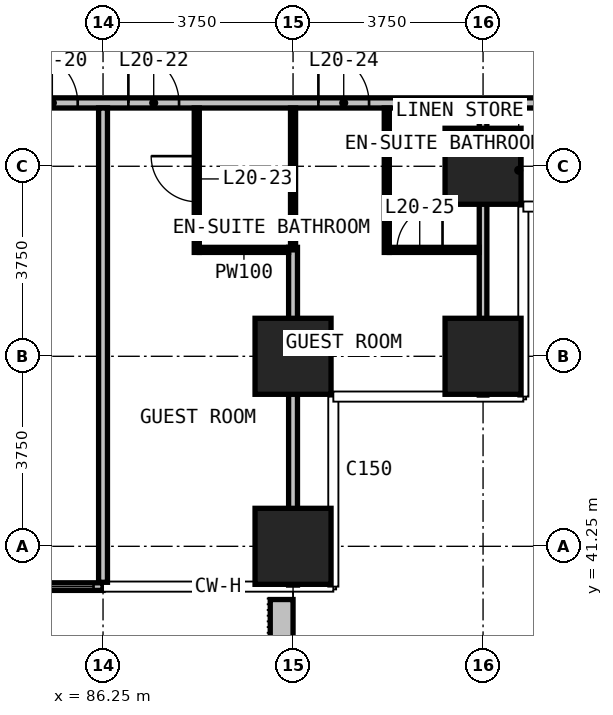
"""IFC4 building model, lengths in metres.
Left out: names, types, materials, properties, quantities, classifications, styles, units other than length and angle.
Written with IfcOpenShell. Run it as: python <this file> out.ifc"""

import sys

from ifc_helpers import new_model, si_unit, direction, frame, frame_2d, origin, origin_2d, place, context, subcontext, project, spatial, rectangle, extrude, element, fill, save


model = new_model("IFC4")
c1 = context("Model", 3, precision=1e-05, world=origin(), true_north=direction((0.0, 1.0)))
c2 = subcontext(c1, "Body", "Model", "MODEL_VIEW")
j1 = project(units=[si_unit("LENGTHUNIT", "METRE"), si_unit("PLANEANGLEUNIT", "RADIAN")], contexts=[c1])
p1 = place(None, origin())
s1 = spatial("IfcSite", under=j1, at=p1, CompositionType="ELEMENT")
p2 = place(p1, origin())
s2 = spatial("IfcBuilding", under=s1, at=p2, CompositionType="ELEMENT")
p3 = place(p2, frame((0.0, 0.0, 85.7)))
s3 = spatial("IfcBuildingStorey", under=s2, at=p3, CompositionType="ELEMENT", Elevation=85.7)
for number, where, z_axis, x_axis in (
    (1, (90.0, 41.25, 0.0), (0.0, 0.0, 1.0), (1.0, 0.0, 0.0)),
    (2, (90.0, 45.0, 0.0), (0.0, 0.0, 1.0), (1.0, 0.0, 0.0)),
    (3, (93.75, 45.0, 0.0), (0.0, 0.0, 1.0), (1.0, 0.0, 0.0)),
    (4, (93.75, 48.75, 0.0), (0.0, 0.0, 1.0), (1.0, 0.0, 0.0)),
):
    element("IfcColumn", number, at=place(p3, frame(where, z_axis=z_axis, x_axis=x_axis)), inside=s3, PredefinedType="COLUMN", context=c2, shape_type="SweptSolid", body=[
        extrude(rectangle(XDim=1.5, YDim=1.5, at=origin_2d()), origin(), (0.0, 0.0, 1.0), 3.3),
    ])
p4 = place(p3, frame((82.5, 40.455, 0.0), z_axis=(0.0, 0.0, 1.0), x_axis=(1.0, 0.0, 0.0)))
e5 = element("IfcWall", 5, at=p4, inside=s3, PredefinedType="SOLIDWALL", context=c2, shape_type="SweptSolid", body=[
    extrude(rectangle(XDim=3.75, YDim=0.15, at=frame_2d((1.875, 0.0))), origin(), (0.0, 0.0, 1.0), 3.0),
])
p5 = place(p4, frame((1.275, 0.0, 0.0)))
e6 = element("IfcOpeningElement", 6, at=p5, cuts=e5, PredefinedType="OPENING", context=c2, shape_type="SweptSolid", body=[
    extrude(rectangle(XDim=1.2, YDim=2.4, at=frame_2d((0.6, 1.2))), frame((0.0, 0.085, 0.0), z_axis=(0.0, -1.0, 0.0), x_axis=(1.0, 0.0, 0.0)), (0.0, 0.0, 1.0), 0.17),
])
p6 = place(p4, frame((2.663, 0.0, 0.1)))
e7 = element("IfcOpeningElement", 7, at=p6, cuts=e5, PredefinedType="OPENING", context=c2, shape_type="SweptSolid", body=[
    extrude(rectangle(XDim=0.9, YDim=2.4, at=frame_2d((0.45, 1.2))), frame((0.0, 0.085, 0.0), z_axis=(0.0, -1.0, 0.0), x_axis=(1.0, 0.0, 0.0)), (0.0, 0.0, 1.0), 0.17),
])
p7 = place(p3, frame((89.775, 40.2, 0.0), z_axis=(0.0, 0.0, 1.0), x_axis=(0.0, -1.0, 0.0)))
e8 = element("IfcWall", 8, at=p7, inside=s3, PredefinedType="USERDEFINED", context=c2, shape_type="SweptSolid", body=[
    extrude(rectangle(XDim=2.35, YDim=0.45, at=frame_2d((1.175, 0.0))), origin(), (0.0, 0.0, 1.0), 1.1),
])
p8 = place(p3, frame((51.735, 50.0, 0.0), z_axis=(0.0, 0.0, 1.0), x_axis=(1.0, 0.0, 0.0)))
e9 = element("IfcWall", 9, at=p8, inside=s3, PredefinedType="PARTITIONING", context=c2, shape_type="SweptSolid", body=[
    extrude(rectangle(XDim=46.53, YDim=0.2, at=frame_2d((23.265, 0.0))), origin(), (0.0, 0.0, 1.0), 3.0),
])
p9 = place(p8, frame((6.765, 0.0, 0.0)))
e10 = element("IfcOpeningElement", 10, at=p9, cuts=e9, PredefinedType="OPENING", context=c2, shape_type="SweptSolid", body=[
    extrude(rectangle(XDim=1.0, YDim=2.2, at=frame_2d((0.5, 1.1))), frame((0.0, 0.11, 0.0), z_axis=(0.0, -1.0, 0.0), x_axis=(1.0, 0.0, 0.0)), (0.0, 0.0, 1.0), 0.22),
])
p10 = place(p8, frame((10.515, 0.0, 0.0)))
e11 = element("IfcOpeningElement", 11, at=p10, cuts=e9, PredefinedType="OPENING", context=c2, shape_type="SweptSolid", body=[
    extrude(rectangle(XDim=1.0, YDim=2.2, at=frame_2d((0.5, 1.1))), frame((0.0, 0.11, 0.0), z_axis=(0.0, -1.0, 0.0), x_axis=(1.0, 0.0, 0.0)), (0.0, 0.0, 1.0), 0.22),
])
p11 = place(p8, frame((12.515, 0.0, 0.0)))
e12 = element("IfcOpeningElement", 12, at=p11, cuts=e9, PredefinedType="OPENING", context=c2, shape_type="SweptSolid", body=[
    extrude(rectangle(XDim=1.0, YDim=2.2, at=frame_2d((0.5, 1.1))), frame((0.0, 0.11, 0.0), z_axis=(0.0, -1.0, 0.0), x_axis=(1.0, 0.0, 0.0)), (0.0, 0.0, 1.0), 0.22),
])
p12 = place(p8, frame((18.015, 0.0, 0.0)))
e13 = element("IfcOpeningElement", 13, at=p12, cuts=e9, PredefinedType="OPENING", context=c2, shape_type="SweptSolid", body=[
    extrude(rectangle(XDim=1.0, YDim=2.2, at=frame_2d((0.5, 1.1))), frame((0.0, 0.11, 0.0), z_axis=(0.0, -1.0, 0.0), x_axis=(1.0, 0.0, 0.0)), (0.0, 0.0, 1.0), 0.22),
])
p13 = place(p8, frame((20.015, 0.0, 0.0)))
e14 = element("IfcOpeningElement", 14, at=p13, cuts=e9, PredefinedType="OPENING", context=c2, shape_type="SweptSolid", body=[
    extrude(rectangle(XDim=1.0, YDim=2.2, at=frame_2d((0.5, 1.1))), frame((0.0, 0.11, 0.0), z_axis=(0.0, -1.0, 0.0), x_axis=(1.0, 0.0, 0.0)), (0.0, 0.0, 1.0), 0.22),
])
p14 = place(p8, frame((25.515, 0.0, 0.0)))
e15 = element("IfcOpeningElement", 15, at=p14, cuts=e9, PredefinedType="OPENING", context=c2, shape_type="SweptSolid", body=[
    extrude(rectangle(XDim=1.0, YDim=2.2, at=frame_2d((0.5, 1.1))), frame((0.0, 0.11, 0.0), z_axis=(0.0, -1.0, 0.0), x_axis=(1.0, 0.0, 0.0)), (0.0, 0.0, 1.0), 0.22),
])
p15 = place(p8, frame((27.515, 0.0, 0.0)))
e16 = element("IfcOpeningElement", 16, at=p15, cuts=e9, PredefinedType="OPENING", context=c2, shape_type="SweptSolid", body=[
    extrude(rectangle(XDim=1.0, YDim=2.2, at=frame_2d((0.5, 1.1))), frame((0.0, 0.11, 0.0), z_axis=(0.0, -1.0, 0.0), x_axis=(1.0, 0.0, 0.0)), (0.0, 0.0, 1.0), 0.22),
])
p16 = place(p8, frame((33.015, 0.0, 0.0)))
e17 = element("IfcOpeningElement", 17, at=p16, cuts=e9, PredefinedType="OPENING", context=c2, shape_type="SweptSolid", body=[
    extrude(rectangle(XDim=1.0, YDim=2.2, at=frame_2d((0.5, 1.1))), frame((0.0, 0.11, 0.0), z_axis=(0.0, -1.0, 0.0), x_axis=(1.0, 0.0, 0.0)), (0.0, 0.0, 1.0), 0.22),
])
p17 = place(p8, frame((35.015, 0.0, 0.0)))
e18 = element("IfcOpeningElement", 18, at=p17, cuts=e9, PredefinedType="OPENING", context=c2, shape_type="SweptSolid", body=[
    extrude(rectangle(XDim=1.0, YDim=2.2, at=frame_2d((0.5, 1.1))), frame((0.0, 0.11, 0.0), z_axis=(0.0, -1.0, 0.0), x_axis=(1.0, 0.0, 0.0)), (0.0, 0.0, 1.0), 0.22),
])
p18 = place(p8, frame((38.765, 0.0, 0.0)))
e19 = element("IfcOpeningElement", 19, at=p18, cuts=e9, PredefinedType="OPENING", context=c2, shape_type="SweptSolid", body=[
    extrude(rectangle(XDim=1.0, YDim=2.2, at=frame_2d((0.5, 1.1))), frame((0.0, 0.11, 0.0), z_axis=(0.0, -1.0, 0.0), x_axis=(1.0, 0.0, 0.0)), (0.0, 0.0, 1.0), 0.22),
])
p19 = place(p8, frame((1.8, 0.0, 0.0)))
e20 = element("IfcOpeningElement", 20, at=p19, cuts=e9, PredefinedType="OPENING", context=c2, shape_type="SweptSolid", body=[
    extrude(rectangle(XDim=0.9, YDim=2.2, at=frame_2d((0.45, 1.1))), frame((0.0, 0.11, 0.0), z_axis=(0.0, -1.0, 0.0), x_axis=(1.0, 0.0, 0.0)), (0.0, 0.0, 1.0), 0.22),
])
p20 = place(p8, frame((43.815, 0.0, 0.0)))
e21 = element("IfcOpeningElement", 21, at=p20, cuts=e9, PredefinedType="OPENING", context=c2, shape_type="SweptSolid", body=[
    extrude(rectangle(XDim=0.9, YDim=2.2, at=frame_2d((0.45, 1.1))), frame((0.0, 0.11, 0.0), z_axis=(0.0, -1.0, 0.0), x_axis=(1.0, 0.0, 0.0)), (0.0, 0.0, 1.0), 0.22),
])
p21 = place(p3, frame((86.25, 40.54, 0.0), z_axis=(0.0, 0.0, 1.0), x_axis=(0.0, 1.0, 0.0)))
e22 = element("IfcWall", 22, at=p21, inside=s3, PredefinedType="PARTITIONING", context=c2, shape_type="SweptSolid", body=[
    extrude(rectangle(XDim=9.36, YDim=0.175, at=frame_2d((4.68, 0.0))), origin(), (0.0, 0.0, 1.0), 3.0),
])
p22 = place(p3, frame((90.0, 40.485, 0.0), z_axis=(0.0, 0.0, 1.0), x_axis=(0.0, 1.0, 0.0)))
e23 = element("IfcWall", 23, at=p22, inside=s3, PredefinedType="PARTITIONING", context=c2, shape_type="SweptSolid", body=[
    extrude(rectangle(XDim=6.665, YDim=0.175, at=frame_2d((3.333, 0.0))), origin(), (0.0, 0.0, 1.0), 3.0),
])
p23 = place(p3, frame((93.75, 44.235, 0.0), z_axis=(0.0, 0.0, 1.0), x_axis=(0.0, 1.0, 0.0)))
e24 = element("IfcWall", 24, at=p23, inside=s3, PredefinedType="PARTITIONING", context=c2, shape_type="SweptSolid", body=[
    extrude(rectangle(XDim=5.665, YDim=0.15, at=frame_2d((2.833, 0.0))), origin(), (0.0, 0.0, 1.0), 3.0),
])
p24 = place(p3, frame((88.15, 47.1, 0.0), z_axis=(0.0, 0.0, 1.0), x_axis=(1.0, 0.0, 0.0)))
e25 = element("IfcWall", 25, at=p24, inside=s3, PredefinedType="PARTITIONING", context=c2, shape_type="SweptSolid", body=[
    extrude(rectangle(XDim=1.762, YDim=0.1, at=frame_2d((0.881, 0.0))), origin(), (0.0, 0.0, 1.0), 3.0),
])
p25 = place(p3, frame((91.9, 47.1, 0.0), z_axis=(0.0, 0.0, 1.0), x_axis=(1.0, 0.0, 0.0)))
e26 = element("IfcWall", 26, at=p25, inside=s3, PredefinedType="PARTITIONING", context=c2, shape_type="SweptSolid", body=[
    extrude(rectangle(XDim=1.775, YDim=0.1, at=frame_2d((0.888, 0.0))), origin(), (0.0, 0.0, 1.0), 3.0),
])
p26 = place(p25, frame((0.15, 0.0, 0.0)))
e27 = element("IfcOpeningElement", 27, at=p26, cuts=e26, PredefinedType="OPENING", context=c2, shape_type="SweptSolid", body=[
    extrude(rectangle(XDim=0.9, YDim=2.2, at=frame_2d((0.45, 1.1))), frame((0.0, 0.06, 0.0), z_axis=(0.0, -1.0, 0.0), x_axis=(1.0, 0.0, 0.0)), (0.0, 0.0, 1.0), 0.12),
])
p27 = place(p3, frame((88.1, 47.05, 0.0), z_axis=(0.0, 0.0, 1.0), x_axis=(0.0, 1.0, 0.0)))
e28 = element("IfcWall", 28, at=p27, inside=s3, PredefinedType="PARTITIONING", context=c2, shape_type="SweptSolid", body=[
    extrude(rectangle(XDim=2.85, YDim=0.1, at=frame_2d((1.425, 0.0))), origin(), (0.0, 0.0, 1.0), 3.0),
])
p28 = place(p27, frame((1.0, 0.0, 0.0)))
e29 = element("IfcOpeningElement", 29, at=p28, cuts=e28, PredefinedType="OPENING", context=c2, shape_type="SweptSolid", body=[
    extrude(rectangle(XDim=0.9, YDim=2.2, at=frame_2d((0.45, 1.1))), frame((0.0, 0.06, 0.0), z_axis=(0.0, -1.0, 0.0), x_axis=(1.0, 0.0, 0.0)), (0.0, 0.0, 1.0), 0.12),
])
p29 = place(p3, frame((90.0, 47.1, 0.0), z_axis=(0.0, 0.0, 1.0), x_axis=(0.0, 1.0, 0.0)))
e30 = element("IfcWall", 30, at=p29, inside=s3, PredefinedType="PARTITIONING", context=c2, shape_type="SweptSolid", body=[
    extrude(rectangle(XDim=2.8, YDim=0.1, at=frame_2d((1.4, 0.0))), origin(), (0.0, 0.0, 1.0), 3.0),
])
p30 = place(p3, frame((91.85, 47.05, 0.0), z_axis=(0.0, 0.0, 1.0), x_axis=(0.0, 1.0, 0.0)))
e31 = element("IfcWall", 31, at=p30, inside=s3, PredefinedType="PARTITIONING", context=c2, shape_type="SweptSolid", body=[
    extrude(rectangle(XDim=2.85, YDim=0.1, at=frame_2d((1.425, 0.0))), origin(), (0.0, 0.0, 1.0), 3.0),
])
p31 = place(p6, origin())
e32 = element("IfcWindow", 32, at=p31, inside=s3, PartitioningType="SINGLE_PANEL", PredefinedType="WINDOW", context=c2, shape_type="SweptSolid", body=[
    extrude(rectangle(XDim=0.9, YDim=2.4, at=frame_2d((0.45, 1.2))), frame((0.0, 0.03, 0.0), z_axis=(0.0, -1.0, 0.0), x_axis=(1.0, 0.0, 0.0)), (0.0, 0.0, 1.0), 0.06),
])
fill(e7, e32)
p32 = place(p16, origin())
e33 = element("IfcDoor", 33, at=p32, inside=s3, OperationType="SINGLE_SWING_RIGHT", PredefinedType="DOOR", context=c2, shape_type="SweptSolid", body=[
    extrude(rectangle(XDim=1.0, YDim=2.2, at=frame_2d((0.5, 1.1))), frame((0.0, 0.025, 0.0), z_axis=(0.0, -1.0, 0.0), x_axis=(1.0, 0.0, 0.0)), (0.0, 0.0, 1.0), 0.05),
])
fill(e17, e33)
p33 = place(p17, origin())
e34 = element("IfcDoor", 34, at=p33, inside=s3, OperationType="SINGLE_SWING_LEFT", PredefinedType="DOOR", context=c2, shape_type="SweptSolid", body=[
    extrude(rectangle(XDim=1.0, YDim=2.2, at=frame_2d((0.5, 1.1))), frame((0.0, 0.025, 0.0), z_axis=(0.0, -1.0, 0.0), x_axis=(1.0, 0.0, 0.0)), (0.0, 0.0, 1.0), 0.05),
])
fill(e18, e34)
p34 = place(p28, origin())
e35 = element("IfcDoor", 35, at=p34, inside=s3, OperationType="SINGLE_SWING_RIGHT", PredefinedType="DOOR", context=c2, shape_type="SweptSolid", body=[
    extrude(rectangle(XDim=0.9, YDim=2.2, at=frame_2d((0.45, 1.1))), frame((0.0, 0.025, 0.0), z_axis=(0.0, -1.0, 0.0), x_axis=(1.0, 0.0, 0.0)), (0.0, 0.0, 1.0), 0.05),
])
fill(e29, e35)
p35 = place(p18, origin())
e36 = element("IfcDoor", 36, at=p35, inside=s3, OperationType="SINGLE_SWING_LEFT", PredefinedType="DOOR", context=c2, shape_type="SweptSolid", body=[
    extrude(rectangle(XDim=1.0, YDim=2.2, at=frame_2d((0.5, 1.1))), frame((0.0, 0.025, 0.0), z_axis=(0.0, -1.0, 0.0), x_axis=(1.0, 0.0, 0.0)), (0.0, 0.0, 1.0), 0.05),
])
fill(e19, e36)
p36 = place(p26, origin())
e37 = element("IfcDoor", 37, at=p36, inside=s3, OperationType="SINGLE_SWING_RIGHT", PredefinedType="DOOR", context=c2, shape_type="SweptSolid", body=[
    extrude(rectangle(XDim=0.9, YDim=2.2, at=frame_2d((0.45, 1.1))), frame((0.0, 0.025, 0.0), z_axis=(0.0, -1.0, 0.0), x_axis=(1.0, 0.0, 0.0)), (0.0, 0.0, 1.0), 0.05),
])
fill(e27, e37)
save(model, sys.argv[1])
